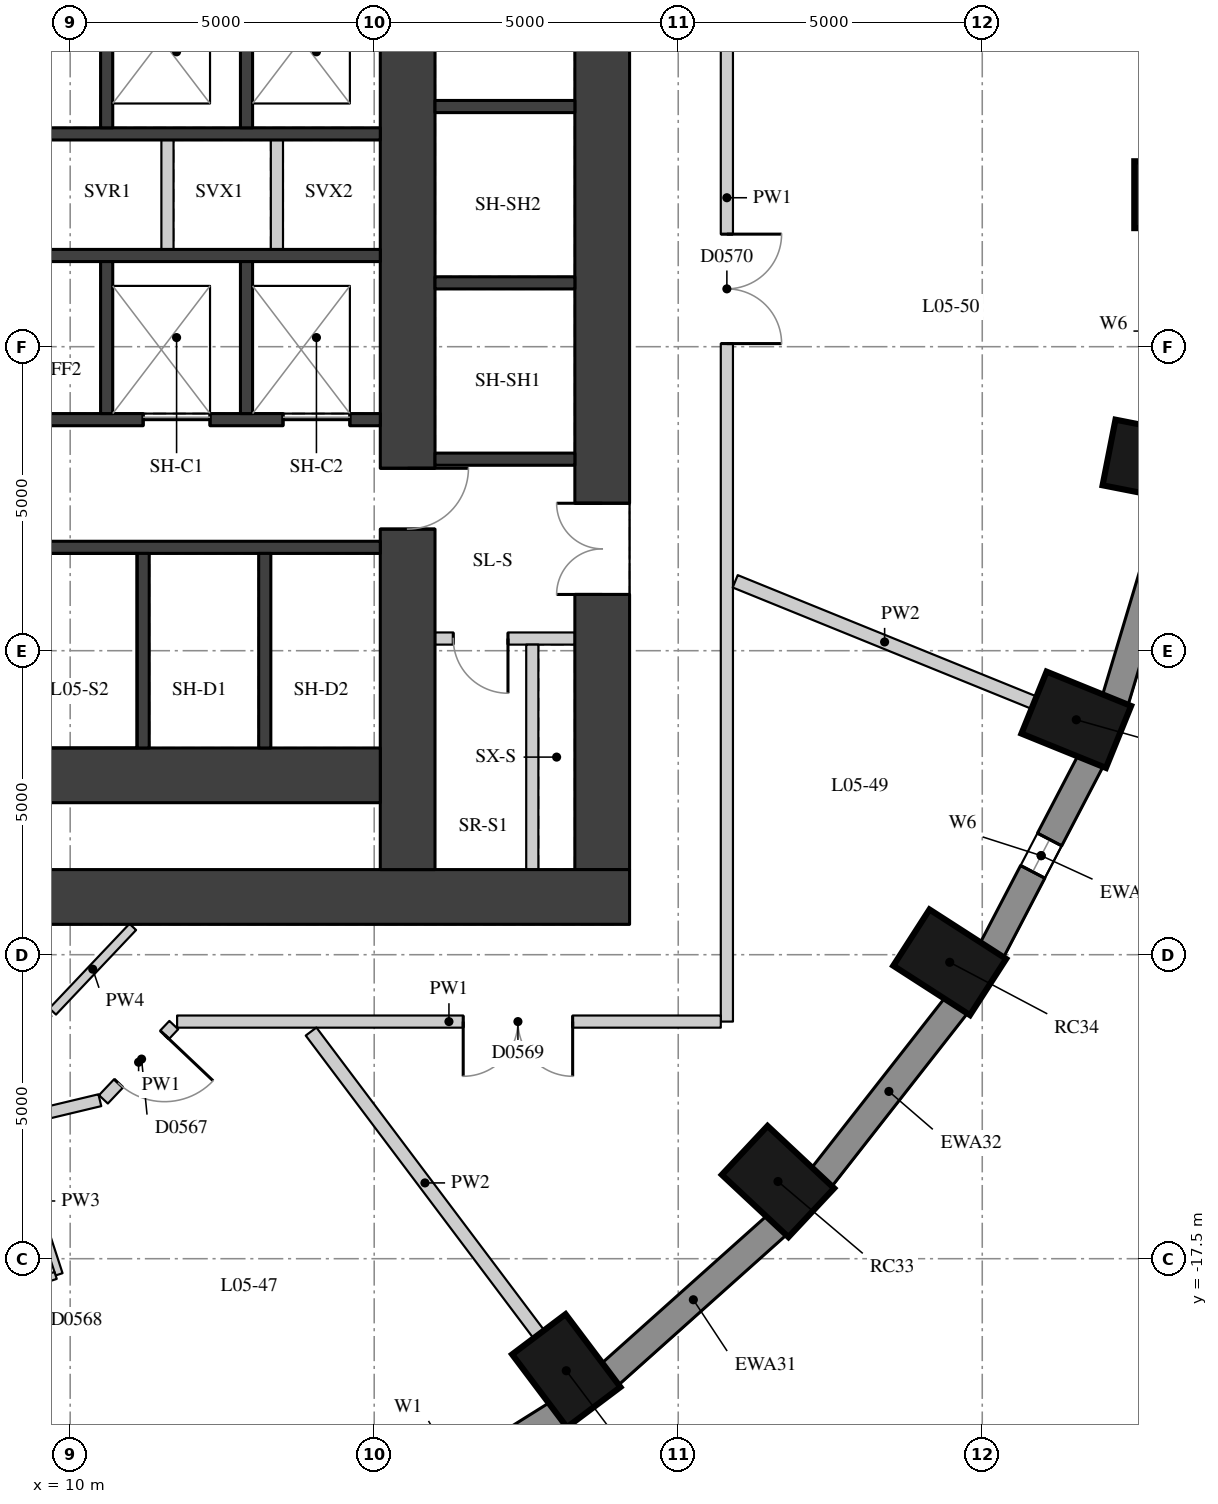
"""IFC4 building model, lengths in metres.
Left out: names, types, materials, properties, quantities, classifications, styles, units other than length and angle.
Written with IfcOpenShell. Run it as: python <this file> out.ifc"""

import sys

from ifc_helpers import new_model, si_unit, direction, frame, frame_2d, origin, origin_2d, place, context, subcontext, project, spatial, rectangle, extrude, element, fill, save


model = new_model("IFC4")
c1 = context("Model", 3, precision=1e-05, world=origin(), true_north=direction((0.0, 1.0)))
c2 = subcontext(c1, "Body", "Model", "MODEL_VIEW")
j1 = project(units=[si_unit("LENGTHUNIT", "METRE"), si_unit("PLANEANGLEUNIT", "RADIAN")], contexts=[c1])
p1 = place(None, origin())
s1 = spatial("IfcSite", under=j1, at=p1, CompositionType="ELEMENT")
p2 = place(p1, origin())
s2 = spatial("IfcBuilding", under=s1, at=p2, CompositionType="ELEMENT")
p3 = place(p2, frame((0.0, 0.0, 25.0)))
s3 = spatial("IfcBuildingStorey", under=s2, at=p3, CompositionType="ELEMENT", Elevation=25.0)
for number, where, z_axis, x_axis in (
    (1, (28.25, 0.0, 0.0), (0.0, 0.0, 1.0), (1.0, 0.0, 0.0)),
    (2, (18.159, -19.343, 0.0), (0.0, 0.0, 1.0), (0.601, -0.799, 0.0)),
    (3, (21.641, -16.23, 0.0), (0.0, 0.0, 1.0), (0.73, -0.683, 0.0)),
    (4, (24.465, -12.625, 0.0), (0.0, 0.0, 1.0), (0.841, -0.541, 0.0)),
    (5, (26.546, -8.636, 0.0), (0.0, 0.0, 1.0), (0.927, -0.376, 0.0)),
    (6, (27.821, -4.385, 0.0), (0.0, 0.0, 1.0), (0.981, -0.193, 0.0)),
):
    element("IfcColumn", number, at=place(p3, frame(where, z_axis=z_axis, x_axis=x_axis)), inside=s3, PredefinedType="COLUMN", context=c2, shape_type="SweptSolid", body=[
        extrude(rectangle(XDim=1.5, YDim=1.1, at=origin_2d()), origin(), (0.0, 0.0, 1.0), 3.3),
    ])
p4 = place(p3, frame((14.817, -22.051, 0.0), z_axis=(0.0, 0.0, 1.0), x_axis=(0.847635480093, 0.530579016629, 0.0)))
e7 = element("IfcWall", 7, at=p4, inside=s3, PredefinedType="SOLIDWALL", context=c2, shape_type="SweptSolid", body=[
    extrude(rectangle(XDim=3.782, YDim=0.45, at=frame_2d((1.891, 0.0))), origin(), (0.0, 0.0, 1.0), 3.02),
])
p5 = place(p4, frame((0.791, 0.0, 0.4)))
e8 = element("IfcOpeningElement", 8, at=p5, cuts=e7, PredefinedType="OPENING", context=c2, shape_type="SweptSolid", body=[
    extrude(rectangle(XDim=2.2, YDim=1.75, at=frame_2d((1.1, 0.875))), frame((0.0, 0.235, 0.0), z_axis=(0.0, -1.0, 0.0), x_axis=(1.0, 0.0, 0.0)), (0.0, 0.0, 1.0), 0.47),
])
p6 = place(p3, frame((18.871, -19.407, 0.0), z_axis=(0.0, 0.0, 1.0), x_axis=(0.745526233716, 0.66647628228, 0.0)))
e9 = element("IfcWall", 9, at=p6, inside=s3, PredefinedType="SOLIDWALL", context=c2, shape_type="SweptSolid", body=[
    extrude(rectangle(XDim=3.697, YDim=0.45, at=frame_2d((1.848, 0.0))), origin(), (0.0, 0.0, 1.0), 3.02),
])
p7 = place(p3, frame((22.352, -16.17, 0.0), z_axis=(0.0, 0.0, 1.0), x_axis=(0.616661975264, 0.787228053529, 0.0)))
e10 = element("IfcWall", 10, at=p7, inside=s3, PredefinedType="SOLIDWALL", context=c2, shape_type="SweptSolid", body=[
    extrude(rectangle(XDim=3.61, YDim=0.45, at=frame_2d((1.805, 0.0))), origin(), (0.0, 0.0, 1.0), 3.02),
])
p8 = place(p3, frame((25.152, -12.437, 0.0), z_axis=(0.0, 0.0, 1.0), x_axis=(0.462492775226, 0.886623050041, 0.0)))
e11 = element("IfcWall", 11, at=p8, inside=s3, PredefinedType="SOLIDWALL", context=c2, shape_type="SweptSolid", body=[
    extrude(rectangle(XDim=3.532, YDim=0.45, at=frame_2d((1.766, 0.0))), origin(), (0.0, 0.0, 1.0), 3.02),
])
p9 = place(p8, frame((1.466, 0.0, 0.4)))
e12 = element("IfcOpeningElement", 12, at=p9, cuts=e11, PredefinedType="OPENING", context=c2, shape_type="SweptSolid", body=[
    extrude(rectangle(XDim=0.6, YDim=1.75, at=frame_2d((0.3, 0.875))), frame((0.0, 0.235, 0.0), z_axis=(0.0, -1.0, 0.0), x_axis=(1.0, 0.0, 0.0)), (0.0, 0.0, 1.0), 0.47),
])
p10 = place(p3, frame((27.185, -8.323, 0.0), z_axis=(0.0, 0.0, 1.0), x_axis=(0.287064133733, 0.957911364963, 0.0)))
e13 = element("IfcWall", 13, at=p10, inside=s3, PredefinedType="SOLIDWALL", context=c2, shape_type="SweptSolid", body=[
    extrude(rectangle(XDim=3.473, YDim=0.45, at=frame_2d((1.737, 0.0))), origin(), (0.0, 0.0, 1.0), 3.02),
])
p11 = place(p3, frame((18.75, -11.1, 0.0), z_axis=(0.0, 0.0, 1.0), x_axis=(0.0, 1.0, 0.0)))
e14 = element("IfcWall", 14, at=p11, inside=s3, PredefinedType="SHEAR", context=c2, shape_type="SweptSolid", body=[
    extrude(rectangle(XDim=22.2, YDim=0.9, at=frame_2d((11.1, 0.0))), origin(), (0.0, 0.0, 1.0), 3.02),
])
p12 = place(p11, frame((15.925, 0.0, 0.0)))
e15 = element("IfcOpeningElement", 15, at=p12, cuts=e14, PredefinedType="OPENING", context=c2, shape_type="SweptSolid", body=[
    extrude(rectangle(XDim=1.5, YDim=2.1, at=frame_2d((0.75, 1.05))), frame((0.0, 0.46, 0.0), z_axis=(0.0, -1.0, 0.0), x_axis=(1.0, 0.0, 0.0)), (0.0, 0.0, 1.0), 0.92),
])
p13 = place(p11, frame((4.525, 0.0, 0.0)))
e16 = element("IfcOpeningElement", 16, at=p13, cuts=e14, PredefinedType="OPENING", context=c2, shape_type="SweptSolid", body=[
    extrude(rectangle(XDim=1.5, YDim=2.1, at=frame_2d((0.75, 1.05))), frame((0.0, 0.46, 0.0), z_axis=(0.0, -1.0, 0.0), x_axis=(1.0, 0.0, 0.0)), (0.0, 0.0, 1.0), 0.92),
])
p14 = place(p3, frame((4.0, -11.55, 0.0), z_axis=(0.0, 0.0, 1.0), x_axis=(1.0, 0.0, 0.0)))
e17 = element("IfcWall", 17, at=p14, inside=s3, PredefinedType="SHEAR", context=c2, shape_type="SweptSolid", body=[
    extrude(rectangle(XDim=15.2, YDim=0.9, at=frame_2d((7.6, 0.0))), origin(), (0.0, 0.0, 1.0), 3.02),
])
p15 = place(p3, frame((15.55, -11.1, 0.0), z_axis=(0.0, 0.0, 1.0), x_axis=(0.0, 1.0, 0.0)))
e18 = element("IfcWall", 18, at=p15, inside=s3, PredefinedType="SHEAR", context=c2, shape_type="SweptSolid", body=[
    extrude(rectangle(XDim=22.2, YDim=0.9, at=frame_2d((11.1, 0.0))), origin(), (0.0, 0.0, 1.0), 3.02),
])
p16 = place(p15, frame((15.6, 0.0, 0.0)))
e19 = element("IfcOpeningElement", 19, at=p16, cuts=e18, PredefinedType="OPENING", context=c2, shape_type="SweptSolid", body=[
    extrude(rectangle(XDim=1.0, YDim=2.1, at=frame_2d((0.5, 1.05))), frame((0.0, 0.46, 0.0), z_axis=(0.0, -1.0, 0.0), x_axis=(1.0, 0.0, 0.0)), (0.0, 0.0, 1.0), 0.92),
])
p17 = place(p15, frame((5.6, 0.0, 0.0)))
e20 = element("IfcOpeningElement", 20, at=p17, cuts=e18, PredefinedType="OPENING", context=c2, shape_type="SweptSolid", body=[
    extrude(rectangle(XDim=1.0, YDim=2.1, at=frame_2d((0.5, 1.05))), frame((0.0, 0.46, 0.0), z_axis=(0.0, -1.0, 0.0), x_axis=(1.0, 0.0, 0.0)), (0.0, 0.0, 1.0), 0.92),
])
p18 = place(p3, frame((4.9, -9.55, 0.0), z_axis=(0.0, 0.0, 1.0), x_axis=(1.0, 0.0, 0.0)))
e21 = element("IfcWall", 21, at=p18, inside=s3, PredefinedType="SHEAR", context=c2, shape_type="SweptSolid", body=[
    extrude(rectangle(XDim=10.2, YDim=0.9, at=frame_2d((5.1, 0.0))), origin(), (0.0, 0.0, 1.0), 3.02),
])
for number, where, z_axis, x_axis in (
    (22, (4.9, 1.0, 0.0), (0.0, 0.0, 1.0), (1.0, 0.0, 0.0)),
    (23, (4.9, -1.0, 0.0), (0.0, 0.0, 1.0), (1.0, 0.0, 0.0)),
):
    element("IfcWall", number, at=place(p3, frame(where, z_axis=z_axis, x_axis=x_axis)), inside=s3, PredefinedType="SHEAR", context=c2, shape_type="SweptSolid", body=[
        extrude(rectangle(XDim=10.2, YDim=0.2, at=frame_2d((5.1, 0.0))), origin(), (0.0, 0.0, 1.0), 3.02),
    ])
p19 = place(p3, frame((4.9, -3.7, 0.0), z_axis=(0.0, 0.0, 1.0), x_axis=(1.0, 0.0, 0.0)))
e24 = element("IfcWall", 24, at=p19, inside=s3, PredefinedType="SHEAR", context=c2, shape_type="SweptSolid", body=[
    extrude(rectangle(XDim=10.2, YDim=0.2, at=frame_2d((5.1, 0.0))), origin(), (0.0, 0.0, 1.0), 3.02),
])
p20 = place(p19, frame((6.3, 0.0, 0.0)))
e25 = element("IfcOpeningElement", 25, at=p20, cuts=e24, PredefinedType="OPENING", context=c2, shape_type="SweptSolid", body=[
    extrude(rectangle(XDim=1.1, YDim=2.1, at=frame_2d((0.55, 1.05))), frame((0.0, 0.11, 0.0), z_axis=(0.0, -1.0, 0.0), x_axis=(1.0, 0.0, 0.0)), (0.0, 0.0, 1.0), 0.22),
])
p21 = place(p19, frame((8.6, 0.0, 0.0)))
e26 = element("IfcOpeningElement", 26, at=p21, cuts=e24, PredefinedType="OPENING", context=c2, shape_type="SweptSolid", body=[
    extrude(rectangle(XDim=1.1, YDim=2.1, at=frame_2d((0.55, 1.05))), frame((0.0, 0.11, 0.0), z_axis=(0.0, -1.0, 0.0), x_axis=(1.0, 0.0, 0.0)), (0.0, 0.0, 1.0), 0.22),
])
p22 = place(p3, frame((4.9, -5.8, 0.0), z_axis=(0.0, 0.0, 1.0), x_axis=(1.0, 0.0, 0.0)))
e27 = element("IfcWall", 27, at=p22, inside=s3, PredefinedType="SHEAR", context=c2, shape_type="SweptSolid", body=[
    extrude(rectangle(XDim=10.2, YDim=0.2, at=frame_2d((5.1, 0.0))), origin(), (0.0, 0.0, 1.0), 3.02),
])
for number, where, z_axis, x_axis in (
    (28, (11.2, -9.1, 0.0), (0.0, 0.0, 1.0), (0.0, 1.0, 0.0)),
    (29, (13.2, -9.1, 0.0), (0.0, 0.0, 1.0), (0.0, 1.0, 0.0)),
):
    element("IfcWall", number, at=place(p3, frame(where, z_axis=z_axis, x_axis=x_axis)), inside=s3, PredefinedType="SHEAR", context=c2, shape_type="SweptSolid", body=[
        extrude(rectangle(XDim=3.2, YDim=0.2, at=frame_2d((1.6, 0.0))), origin(), (0.0, 0.0, 1.0), 3.02),
    ])
for number, where, z_axis, x_axis in (
    (30, (10.6, 1.1, 0.0), (0.0, 0.0, 1.0), (0.0, 1.0, 0.0)),
    (31, (10.6, -3.6, 0.0), (0.0, 0.0, 1.0), (0.0, 1.0, 0.0)),
    (32, (12.9, 1.1, 0.0), (0.0, 0.0, 1.0), (0.0, 1.0, 0.0)),
    (33, (12.9, -3.6, 0.0), (0.0, 0.0, 1.0), (0.0, 1.0, 0.0)),
):
    element("IfcWall", number, at=place(p3, frame(where, z_axis=z_axis, x_axis=x_axis)), inside=s3, PredefinedType="SHEAR", context=c2, shape_type="SweptSolid", body=[
        extrude(rectangle(XDim=2.5, YDim=0.2, at=frame_2d((1.25, 0.0))), origin(), (0.0, 0.0, 1.0), 3.02),
    ])
for number, where, z_axis, x_axis in (
    (34, (11.6, -0.9, 0.0), (0.0, 0.0, 1.0), (0.0, 1.0, 0.0)),
    (35, (13.4, -0.9, 0.0), (0.0, 0.0, 1.0), (0.0, 1.0, 0.0)),
):
    element("IfcWall", number, at=place(p3, frame(where, z_axis=z_axis, x_axis=x_axis)), inside=s3, PredefinedType="PARTITIONING", context=c2, shape_type="SweptSolid", body=[
        extrude(rectangle(XDim=1.8, YDim=0.2, at=frame_2d((0.9, 0.0))), origin(), (0.0, 0.0, 1.0), 3.02),
    ])
for number, where, z_axis, x_axis in (
    (36, (16.0, -4.35, 0.0), (0.0, 0.0, 1.0), (1.0, 0.0, 0.0)),
    (37, (16.0, -1.45, 0.0), (0.0, 0.0, 1.0), (1.0, 0.0, 0.0)),
    (38, (16.0, 1.45, 0.0), (0.0, 0.0, 1.0), (1.0, 0.0, 0.0)),
):
    element("IfcWall", number, at=place(p3, frame(where, z_axis=z_axis, x_axis=x_axis)), inside=s3, PredefinedType="SHEAR", context=c2, shape_type="SweptSolid", body=[
        extrude(rectangle(XDim=2.3, YDim=0.2, at=frame_2d((1.15, 0.0))), origin(), (0.0, 0.0, 1.0), 3.02),
    ])
p23 = place(p3, frame((16.0, -7.3, 0.0), z_axis=(0.0, 0.0, 1.0), x_axis=(1.0, 0.0, 0.0)))
e39 = element("IfcWall", 39, at=p23, inside=s3, PredefinedType="PARTITIONING", context=c2, shape_type="SweptSolid", body=[
    extrude(rectangle(XDim=2.3, YDim=0.2, at=frame_2d((1.15, 0.0))), origin(), (0.0, 0.0, 1.0), 3.02),
])
p24 = place(p23, frame((0.3, 0.0, 0.0)))
e40 = element("IfcOpeningElement", 40, at=p24, cuts=e39, PredefinedType="OPENING", context=c2, shape_type="SweptSolid", body=[
    extrude(rectangle(XDim=0.9, YDim=2.1, at=frame_2d((0.45, 1.05))), frame((0.0, 0.11, 0.0), z_axis=(0.0, -1.0, 0.0), x_axis=(1.0, 0.0, 0.0)), (0.0, 0.0, 1.0), 0.22),
])
p25 = place(p3, frame((17.6, -11.1, 0.0), z_axis=(0.0, 0.0, 1.0), x_axis=(0.0, 1.0, 0.0)))
e41 = element("IfcWall", 41, at=p25, inside=s3, PredefinedType="PARTITIONING", context=c2, shape_type="SweptSolid", body=[
    extrude(rectangle(XDim=3.7, YDim=0.2, at=frame_2d((1.85, 0.0))), origin(), (0.0, 0.0, 1.0), 3.02),
])
p26 = place(p3, frame((20.8, 13.5, 0.0), z_axis=(0.0, 0.0, 1.0), x_axis=(0.0, -1.0, 0.0)))
e42 = element("IfcWall", 42, at=p26, inside=s3, PredefinedType="PARTITIONING", context=c2, shape_type="SweptSolid", body=[
    extrude(rectangle(XDim=27.1, YDim=0.2, at=frame_2d((13.55, 0.0))), origin(), (0.0, 0.0, 1.0), 3.02),
])
p27 = place(p26, frame((14.149, 0.0, 0.0)))
e43 = element("IfcOpeningElement", 43, at=p27, cuts=e42, PredefinedType="OPENING", context=c2, shape_type="SweptSolid", body=[
    extrude(rectangle(XDim=1.8, YDim=2.1, at=frame_2d((0.9, 1.05))), frame((0.0, 0.11, 0.0), z_axis=(0.0, -1.0, 0.0), x_axis=(1.0, 0.0, 0.0)), (0.0, 0.0, 1.0), 0.22),
])
p28 = place(p26, frame((5.864, 0.0, 0.0)))
e44 = element("IfcOpeningElement", 44, at=p28, cuts=e42, PredefinedType="OPENING", context=c2, shape_type="SweptSolid", body=[
    extrude(rectangle(XDim=1.8, YDim=2.1, at=frame_2d((0.9, 1.05))), frame((0.0, 0.11, 0.0), z_axis=(0.0, -1.0, 0.0), x_axis=(1.0, 0.0, 0.0)), (0.0, 0.0, 1.0), 0.22),
])
p29 = place(p3, frame((20.7, -13.6, 0.0), z_axis=(0.0, 0.0, 1.0), x_axis=(-1.0, 0.0, 0.0)))
e45 = element("IfcWall", 45, at=p29, inside=s3, PredefinedType="PARTITIONING", context=c2, shape_type="SweptSolid", body=[
    extrude(rectangle(XDim=8.941, YDim=0.2, at=frame_2d((4.471, 0.0))), origin(), (0.0, 0.0, 1.0), 3.02),
])
p30 = place(p29, frame((2.436, 0.0, 0.0)))
e46 = element("IfcOpeningElement", 46, at=p30, cuts=e45, PredefinedType="OPENING", context=c2, shape_type="SweptSolid", body=[
    extrude(rectangle(XDim=1.8, YDim=2.1, at=frame_2d((0.9, 1.05))), frame((0.0, 0.11, 0.0), z_axis=(0.0, -1.0, 0.0), x_axis=(1.0, 0.0, 0.0)), (0.0, 0.0, 1.0), 0.22),
])
p31 = place(p3, frame((11.704, -13.658, 0.0), z_axis=(0.0, 0.0, 1.0), x_axis=(-0.687768795377, -0.725929806597, 0.0)))
e47 = element("IfcWall", 47, at=p31, inside=s3, PredefinedType="PARTITIONING", context=c2, shape_type="SweptSolid", body=[
    extrude(rectangle(XDim=1.683, YDim=0.2, at=frame_2d((0.841, 0.0))), origin(), (0.0, 0.0, 1.0), 3.02),
])
p32 = place(p31, frame((0.22, 0.0, 0.0)))
e48 = element("IfcOpeningElement", 48, at=p32, cuts=e47, PredefinedType="OPENING", context=c2, shape_type="SweptSolid", body=[
    extrude(rectangle(XDim=1.1, YDim=2.1, at=frame_2d((0.55, 1.05))), frame((0.0, 0.11, 0.0), z_axis=(0.0, -1.0, 0.0), x_axis=(1.0, 0.0, 0.0)), (0.0, 0.0, 1.0), 0.22),
])
p33 = place(p3, frame((10.488, -14.893, 0.0), z_axis=(0.0, 0.0, 1.0), x_axis=(-0.972603489924, -0.23247032367, 0.0)))
e49 = element("IfcWall", 49, at=p33, inside=s3, PredefinedType="PARTITIONING", context=c2, shape_type="SweptSolid", body=[
    extrude(rectangle(XDim=10.783, YDim=0.2, at=frame_2d((5.392, 0.0))), origin(), (0.0, 0.0, 1.0), 3.02),
])
p34 = place(p33, frame((8.59, 0.0, 0.0)))
e50 = element("IfcOpeningElement", 50, at=p34, cuts=e49, PredefinedType="OPENING", context=c2, shape_type="SweptSolid", body=[
    extrude(rectangle(XDim=0.9, YDim=2.1, at=frame_2d((0.45, 1.05))), frame((0.0, 0.11, 0.0), z_axis=(0.0, -1.0, 0.0), x_axis=(1.0, 0.0, 0.0)), (0.0, 0.0, 1.0), 0.22),
])
p35 = place(p33, frame((5.462, 0.0, 0.0)))
e51 = element("IfcOpeningElement", 51, at=p35, cuts=e49, PredefinedType="OPENING", context=c2, shape_type="SweptSolid", body=[
    extrude(rectangle(XDim=1.0, YDim=2.1, at=frame_2d((0.5, 1.05))), frame((0.0, 0.11, 0.0), z_axis=(0.0, -1.0, 0.0), x_axis=(1.0, 0.0, 0.0)), (0.0, 0.0, 1.0), 0.22),
])
p36 = place(p3, frame((11.03, -12.043, 0.0), z_axis=(0.0, 0.0, 1.0), x_axis=(-0.687734044261, -0.725962729322, 0.0)))
e52 = element("IfcWall", 52, at=p36, inside=s3, PredefinedType="PARTITIONING", context=c2, shape_type="SweptSolid", body=[
    extrude(rectangle(XDim=1.916, YDim=0.15, at=frame_2d((0.958, 0.0))), origin(), (0.0, 0.0, 1.0), 3.02),
])
p37 = place(p3, frame((17.708, -18.743, 0.0), z_axis=(0.0, 0.0, 1.0), x_axis=(-0.601177883261, 0.799115231164, 0.0)))
e53 = element("IfcWall", 53, at=p37, inside=s3, PredefinedType="PARTITIONING", context=c2, shape_type="SweptSolid", body=[
    extrude(rectangle(XDim=6.231, YDim=0.22, at=frame_2d((3.116, 0.0))), origin(), (0.0, 0.0, 1.0), 3.02),
])
p38 = place(p3, frame((25.851, -8.354, 0.0), z_axis=(0.0, 0.0, 1.0), x_axis=(-0.926546814299, 0.376179479653, 0.0)))
e54 = element("IfcWall", 54, at=p38, inside=s3, PredefinedType="PARTITIONING", context=c2, shape_type="SweptSolid", body=[
    extrude(rectangle(XDim=5.304, YDim=0.22, at=frame_2d((2.652, 0.0))), origin(), (0.0, 0.0, 1.0), 3.02),
])
p39 = place(p3, frame((9.03, -15.344, 0.0), z_axis=(0.0, 0.0, 1.0), x_axis=(0.310275804943, -0.950646582525, 0.0)))
e55 = element("IfcWall", 55, at=p39, inside=s3, PredefinedType="PARTITIONING", context=c2, shape_type="SweptSolid", body=[
    extrude(rectangle(XDim=2.538, YDim=0.12, at=frame_2d((1.269, 0.0))), origin(), (0.0, 0.0, 1.0), 3.02),
])
p40 = place(p3, frame((9.76, -17.775, 0.0), z_axis=(0.0, 0.0, 1.0), x_axis=(-0.950599833202, -0.310419002506, 0.0)))
e56 = element("IfcWall", 56, at=p40, inside=s3, PredefinedType="PARTITIONING", context=c2, shape_type="SweptSolid", body=[
    extrude(rectangle(XDim=1.83, YDim=0.12, at=frame_2d((0.915, 0.0))), origin(), (0.0, 0.0, 1.0), 3.02),
])
p41 = place(p40, frame((0.54, 0.0, 0.0)))
e57 = element("IfcOpeningElement", 57, at=p41, cuts=e56, PredefinedType="OPENING", context=c2, shape_type="SweptSolid", body=[
    extrude(rectangle(XDim=0.8, YDim=2.1, at=frame_2d((0.4, 1.05))), frame((0.0, 0.07, 0.0), z_axis=(0.0, -1.0, 0.0), x_axis=(1.0, 0.0, 0.0)), (0.0, 0.0, 1.0), 0.14),
])
p42 = place(p9, origin())
e58 = element("IfcWindow", 58, at=p42, inside=s3, PartitioningType="SINGLE_PANEL", PredefinedType="WINDOW", context=c2, shape_type="SweptSolid", body=[
    extrude(rectangle(XDim=0.6, YDim=1.75, at=frame_2d((0.3, 0.875))), frame((0.0, 0.035, 0.0), z_axis=(0.0, -1.0, 0.0), x_axis=(1.0, 0.0, 0.0)), (0.0, 0.0, 1.0), 0.06),
])
fill(e12, e58)
p43 = place(p13, origin())
e59 = element("IfcDoor", 59, at=p43, inside=s3, OperationType="DOUBLE_DOOR_SINGLE_SWING", PredefinedType="DOOR", context=c2, shape_type="SweptSolid", body=[
    extrude(rectangle(XDim=1.5, YDim=2.1, at=frame_2d((0.75, 1.05))), frame((0.0, 0.025, 0.0), z_axis=(0.0, -1.0, 0.0), x_axis=(1.0, 0.0, 0.0)), (0.0, 0.0, 1.0), 0.05),
])
fill(e16, e59)
p44 = place(p20, origin())
e60 = element("IfcDoor", 60, at=p44, inside=s3, OperationType="DOUBLE_DOOR_SLIDING", PredefinedType="DOOR", context=c2, shape_type="SweptSolid", body=[
    extrude(rectangle(XDim=1.1, YDim=2.1, at=frame_2d((0.55, 1.05))), frame((0.0, 0.025, 0.0), z_axis=(0.0, -1.0, 0.0), x_axis=(1.0, 0.0, 0.0)), (0.0, 0.0, 1.0), 0.05),
])
fill(e25, e60)
p45 = place(p21, origin())
e61 = element("IfcDoor", 61, at=p45, inside=s3, OperationType="DOUBLE_DOOR_SLIDING", PredefinedType="DOOR", context=c2, shape_type="SweptSolid", body=[
    extrude(rectangle(XDim=1.1, YDim=2.1, at=frame_2d((0.55, 1.05))), frame((0.0, 0.025, 0.0), z_axis=(0.0, -1.0, 0.0), x_axis=(1.0, 0.0, 0.0)), (0.0, 0.0, 1.0), 0.05),
])
fill(e26, e61)
p46 = place(p17, origin())
e62 = element("IfcDoor", 62, at=p46, inside=s3, OperationType="SINGLE_SWING_LEFT", PredefinedType="DOOR", context=c2, shape_type="SweptSolid", body=[
    extrude(rectangle(XDim=1.0, YDim=2.1, at=frame_2d((0.5, 1.05))), frame((0.0, 0.025, 0.0), z_axis=(0.0, -1.0, 0.0), x_axis=(1.0, 0.0, 0.0)), (0.0, 0.0, 1.0), 0.05),
])
fill(e20, e62)
p47 = place(p24, origin())
e63 = element("IfcDoor", 63, at=p47, inside=s3, OperationType="SINGLE_SWING_LEFT", PredefinedType="DOOR", context=c2, shape_type="SweptSolid", body=[
    extrude(rectangle(XDim=0.9, YDim=2.1, at=frame_2d((0.45, 1.05))), frame((0.0, 0.025, 0.0), z_axis=(0.0, -1.0, 0.0), x_axis=(1.0, 0.0, 0.0)), (0.0, 0.0, 1.0), 0.05),
])
fill(e40, e63)
p48 = place(p32, origin())
e64 = element("IfcDoor", 64, at=p48, inside=s3, OperationType="SINGLE_SWING_LEFT", PredefinedType="DOOR", context=c2, shape_type="SweptSolid", body=[
    extrude(rectangle(XDim=1.1, YDim=2.1, at=frame_2d((0.55, 1.05))), frame((0.0, 0.025, 0.0), z_axis=(0.0, -1.0, 0.0), x_axis=(1.0, 0.0, 0.0)), (0.0, 0.0, 1.0), 0.05),
])
fill(e48, e64)
p49 = place(p30, origin())
e65 = element("IfcDoor", 65, at=p49, inside=s3, OperationType="DOUBLE_DOOR_SINGLE_SWING", PredefinedType="DOOR", context=c2, shape_type="SweptSolid", body=[
    extrude(rectangle(XDim=1.8, YDim=2.1, at=frame_2d((0.9, 1.05))), frame((0.0, 0.025, 0.0), z_axis=(0.0, -1.0, 0.0), x_axis=(1.0, 0.0, 0.0)), (0.0, 0.0, 1.0), 0.05),
])
fill(e46, e65)
p50 = place(p27, origin())
e66 = element("IfcDoor", 66, at=p50, inside=s3, OperationType="DOUBLE_DOOR_SINGLE_SWING", PredefinedType="DOOR", context=c2, shape_type="SweptSolid", body=[
    extrude(rectangle(XDim=1.8, YDim=2.1, at=frame_2d((0.9, 1.05))), frame((0.0, 0.025, 0.0), z_axis=(0.0, -1.0, 0.0), x_axis=(1.0, 0.0, 0.0)), (0.0, 0.0, 1.0), 0.05),
])
fill(e43, e66)
save(model, sys.argv[1])
